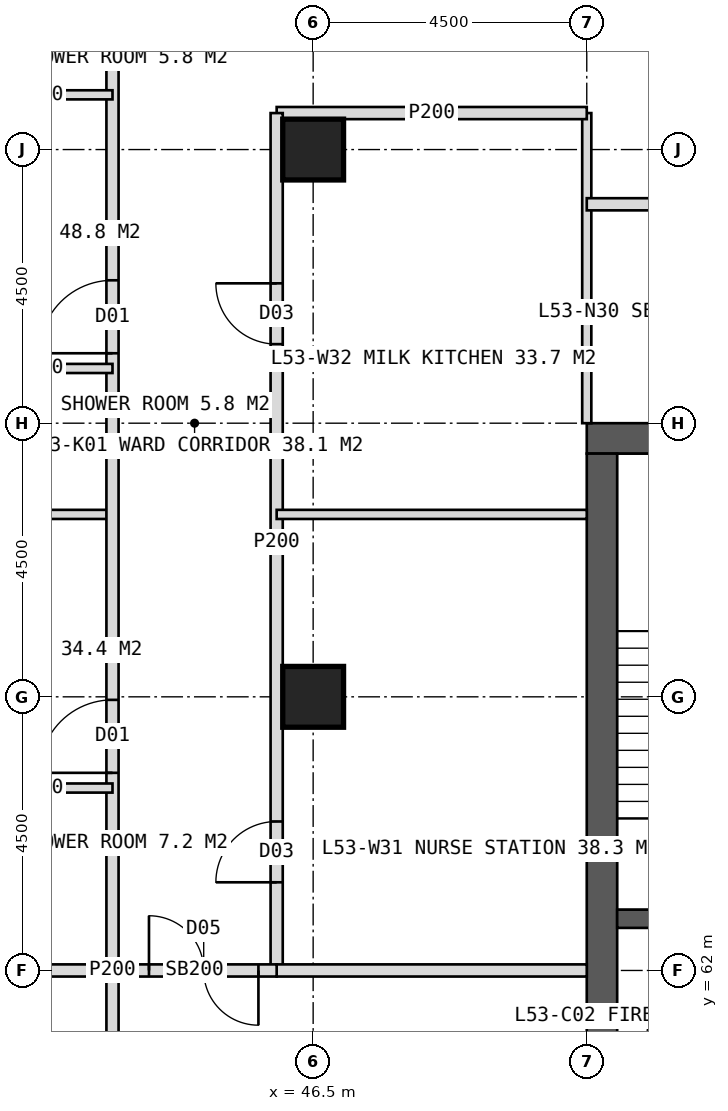
"""IFC4 building model, lengths in metres.
Left out: names, types, materials, properties, quantities, classifications, styles, units other than length and angle.
Written with IfcOpenShell. Run it as: python <this file> out.ifc"""

import sys

from ifc_helpers import new_model, si_unit, direction, frame, frame_2d, origin, origin_2d, place, context, subcontext, project, spatial, rectangle, hollow_rectangle, extrude, element, fill, save


model = new_model("IFC4")
c1 = context("Model", 3, precision=1e-05, world=origin(), true_north=direction((0.0, 1.0)))
c2 = subcontext(c1, "Body", "Model", "MODEL_VIEW")
j1 = project(units=[si_unit("LENGTHUNIT", "METRE"), si_unit("PLANEANGLEUNIT", "RADIAN")], contexts=[c1])
p1 = place(None, origin())
s1 = spatial("IfcSite", under=j1, at=p1, CompositionType="ELEMENT")
p2 = place(p1, origin())
s2 = spatial("IfcBuilding", under=s1, at=p2, CompositionType="ELEMENT")
p3 = place(p2, frame((0.0, 0.0, 221.0)))
s3 = spatial("IfcBuildingStorey", under=s2, at=p3, CompositionType="ELEMENT", Elevation=221.0)
p4 = place(p3, frame((51.0, 70.75, 0.0), z_axis=(0.0, 0.0, 1.0), x_axis=(1.0, 0.0, 0.0)))
e1 = element("IfcWall", 1, at=p4, inside=s3, PredefinedType="SHEAR", context=c2, shape_type="SweptSolid", body=[
    extrude(rectangle(XDim=18.0, YDim=0.5, at=frame_2d((9.0, 0.0))), origin(), (0.0, 0.0, 1.0), 4.0),
])
p5 = place(p4, frame((8.1, 0.0, 0.0)))
e2 = element("IfcOpeningElement", 2, at=p5, cuts=e1, PredefinedType="OPENING", context=c2, shape_type="SweptSolid", body=[
    extrude(rectangle(XDim=1.8, YDim=2.2, at=frame_2d((0.9, 1.1))), frame((0.0, 0.26, 0.0), z_axis=(0.0, -1.0, 0.0), x_axis=(1.0, 0.0, 0.0)), (0.0, 0.0, 1.0), 0.52),
])
p6 = place(p3, frame((51.25, 53.5, 0.0), z_axis=(0.0, 0.0, 1.0), x_axis=(0.0, 1.0, 0.0)))
e3 = element("IfcWall", 3, at=p6, inside=s3, PredefinedType="SHEAR", context=c2, shape_type="SweptSolid", body=[
    extrude(rectangle(XDim=17.0, YDim=0.5, at=frame_2d((8.5, 0.0))), origin(), (0.0, 0.0, 1.0), 4.0),
])
p7 = place(p6, frame((6.1, 0.0, 0.0)))
e4 = element("IfcOpeningElement", 4, at=p7, cuts=e3, PredefinedType="OPENING", context=c2, shape_type="SweptSolid", body=[
    extrude(rectangle(XDim=1.5, YDim=2.2, at=frame_2d((0.75, 1.1))), frame((0.0, 0.26, 0.0), z_axis=(0.0, -1.0, 0.0), x_axis=(1.0, 0.0, 0.0)), (0.0, 0.0, 1.0), 0.52),
])
p8 = place(p3, frame((51.5, 62.85, 0.0), z_axis=(0.0, 0.0, 1.0), x_axis=(1.0, 0.0, 0.0)))
e5 = element("IfcWall", 5, at=p8, inside=s3, PredefinedType="SHEAR", context=c2, shape_type="SweptSolid", body=[
    extrude(rectangle(XDim=3.3, YDim=0.3, at=frame_2d((1.65, 0.0))), origin(), (0.0, 0.0, 1.0), 4.0),
])
p9 = place(p8, frame((1.15, 0.0, 0.0)))
e6 = element("IfcOpeningElement", 6, at=p9, cuts=e5, PredefinedType="OPENING", context=c2, shape_type="SweptSolid", body=[
    extrude(rectangle(XDim=1.2, YDim=2.1, at=frame_2d((0.6, 1.05))), frame((0.0, 0.16, 0.0), z_axis=(0.0, -1.0, 0.0), x_axis=(1.0, 0.0, 0.0)), (0.0, 0.0, 1.0), 0.32),
])
for number, where, z_axis, x_axis in (
    (7, (46.5, 75.5, 0.0), (0.0, 0.0, 1.0), (1.0, 0.0, 0.0)),
    (8, (46.5, 66.5, 0.0), (0.0, 0.0, 1.0), (1.0, 0.0, 0.0)),
):
    element("IfcColumn", number, at=place(p3, frame(where, z_axis=z_axis, x_axis=x_axis)), inside=s3, PredefinedType="COLUMN", context=c2, shape_type="SweptSolid", body=[
        extrude(hollow_rectangle(XDim=1.0, YDim=1.0, WallThickness=0.1, at=origin_2d()), origin(), (0.0, 0.0, 1.0), 4.0),
    ])
p10 = place(p3, frame((51.0, 71.0, 0.0), z_axis=(0.0, 0.0, 1.0), x_axis=(0.0, 1.0, 0.0)))
e9 = element("IfcWall", 9, at=p10, inside=s3, PredefinedType="PARTITIONING", context=c2, shape_type="SweptSolid", body=[
    extrude(rectangle(XDim=5.1, YDim=0.15, at=frame_2d((2.55, 0.0))), origin(), (0.0, 0.0, 1.0), 3.75),
])
p11 = place(p3, frame((45.9, 76.1, 0.0), z_axis=(0.0, 0.0, 1.0), x_axis=(1.0, 0.0, 0.0)))
e10 = element("IfcWall", 10, at=p11, inside=s3, PredefinedType="PARTITIONING", context=c2, shape_type="SweptSolid", body=[
    extrude(rectangle(XDim=5.1, YDim=0.2, at=frame_2d((2.55, 0.0))), origin(), (0.0, 0.0, 1.0), 3.75),
])
p12 = place(p3, frame((51.0, 74.6, 0.0), z_axis=(0.0, 0.0, 1.0), x_axis=(1.0, 0.0, 0.0)))
e11 = element("IfcWall", 11, at=p12, inside=s3, PredefinedType="PARTITIONING", context=c2, shape_type="SweptSolid", body=[
    extrude(rectangle(XDim=6.75, YDim=0.2, at=frame_2d((3.375, 0.0))), origin(), (0.0, 0.0, 1.0), 3.75),
])
p13 = place(p12, frame((1.45, 0.0, 0.0)))
e12 = element("IfcOpeningElement", 12, at=p13, cuts=e11, PredefinedType="OPENING", context=c2, shape_type="SweptSolid", body=[
    extrude(rectangle(XDim=1.0, YDim=2.1, at=frame_2d((0.5, 1.05))), frame((0.0, 0.11, 0.0), z_axis=(0.0, -1.0, 0.0), x_axis=(1.0, 0.0, 0.0)), (0.0, 0.0, 1.0), 0.22),
])
p14 = place(p3, frame((43.2, 62.0, 0.0), z_axis=(0.0, 0.0, 1.0), x_axis=(-1.0, 0.0, 0.0)))
e13 = element("IfcWall", 13, at=p14, inside=s3, PredefinedType="SOLIDWALL", context=c2, shape_type="SweptSolid", body=[
    extrude(rectangle(XDim=5.55, YDim=0.2, at=frame_2d((2.775, 0.0))), origin(), (0.0, 0.0, 1.0), 2.95),
])
p15 = place(p3, frame((43.2, 69.5, 0.0), z_axis=(0.0, 0.0, 1.0), x_axis=(-1.0, 0.0, 0.0)))
e14 = element("IfcWall", 14, at=p15, inside=s3, PredefinedType="PARTITIONING", context=c2, shape_type="SweptSolid", body=[
    extrude(rectangle(XDim=5.55, YDim=0.15, at=frame_2d((2.775, 0.0))), origin(), (0.0, 0.0, 1.0), 3.75),
])
p16 = place(p3, frame((43.2, 45.2, 0.0), z_axis=(0.0, 0.0, 1.0), x_axis=(0.0, 1.0, 0.0)))
e15 = element("IfcWall", 15, at=p16, inside=s3, PredefinedType="PARTITIONING", context=c2, shape_type="SweptSolid", body=[
    extrude(rectangle(XDim=33.6, YDim=0.2, at=frame_2d((16.8, 0.0))), origin(), (0.0, 0.0, 1.0), 3.75),
])
p17 = place(p16, frame((3.25, 0.0, 0.0)))
e16 = element("IfcOpeningElement", 16, at=p17, cuts=e15, PredefinedType="OPENING", context=c2, shape_type="SweptSolid", body=[
    extrude(rectangle(XDim=1.2, YDim=2.2, at=frame_2d((0.6, 1.1))), frame((0.0, 0.11, 0.0), z_axis=(0.0, -1.0, 0.0), x_axis=(1.0, 0.0, 0.0)), (0.0, 0.0, 1.0), 0.22),
])
p18 = place(p16, frame((11.05, 0.0, 0.0)))
e17 = element("IfcOpeningElement", 17, at=p18, cuts=e15, PredefinedType="OPENING", context=c2, shape_type="SweptSolid", body=[
    extrude(rectangle(XDim=1.2, YDim=2.2, at=frame_2d((0.6, 1.1))), frame((0.0, 0.11, 0.0), z_axis=(0.0, -1.0, 0.0), x_axis=(1.0, 0.0, 0.0)), (0.0, 0.0, 1.0), 0.22),
])
p19 = place(p16, frame((20.05, 0.0, 0.0)))
e18 = element("IfcOpeningElement", 18, at=p19, cuts=e15, PredefinedType="OPENING", context=c2, shape_type="SweptSolid", body=[
    extrude(rectangle(XDim=1.2, YDim=2.2, at=frame_2d((0.6, 1.1))), frame((0.0, 0.11, 0.0), z_axis=(0.0, -1.0, 0.0), x_axis=(1.0, 0.0, 0.0)), (0.0, 0.0, 1.0), 0.22),
])
p20 = place(p16, frame((26.95, 0.0, 0.0)))
e19 = element("IfcOpeningElement", 19, at=p20, cuts=e15, PredefinedType="OPENING", context=c2, shape_type="SweptSolid", body=[
    extrude(rectangle(XDim=1.2, YDim=2.2, at=frame_2d((0.6, 1.1))), frame((0.0, 0.11, 0.0), z_axis=(0.0, -1.0, 0.0), x_axis=(1.0, 0.0, 0.0)), (0.0, 0.0, 1.0), 0.22),
])
for number, where, z_axis, x_axis in (
    (20, (43.2, 65.0, 0.0), (0.0, 0.0, 1.0), (-1.0, 0.0, 0.0)),
    (21, (43.2, 71.9, 0.0), (0.0, 0.0, 1.0), (-1.0, 0.0, 0.0)),
    (22, (43.2, 76.4, 0.0), (0.0, 0.0, 1.0), (-1.0, 0.0, 0.0)),
):
    element("IfcWall", number, at=place(p3, frame(where, z_axis=z_axis, x_axis=x_axis)), inside=s3, PredefinedType="PARTITIONING", context=c2, shape_type="SweptSolid", body=[
        extrude(rectangle(XDim=2.4, YDim=0.15, at=frame_2d((1.2, 0.0))), origin(), (0.0, 0.0, 1.0), 3.75),
    ])
p21 = place(p3, frame((45.9, 62.0, 0.0), z_axis=(0.0, 0.0, 1.0), x_axis=(0.0, 1.0, 0.0)))
e23 = element("IfcWall", 23, at=p21, inside=s3, PredefinedType="PARTITIONING", context=c2, shape_type="SweptSolid", body=[
    extrude(rectangle(XDim=14.1, YDim=0.2, at=frame_2d((7.05, 0.0))), origin(), (0.0, 0.0, 1.0), 3.75),
])
p22 = place(p21, frame((1.45, 0.0, 0.0)))
e24 = element("IfcOpeningElement", 24, at=p22, cuts=e23, PredefinedType="OPENING", context=c2, shape_type="SweptSolid", body=[
    extrude(rectangle(XDim=1.0, YDim=2.1, at=frame_2d((0.5, 1.05))), frame((0.0, 0.11, 0.0), z_axis=(0.0, -1.0, 0.0), x_axis=(1.0, 0.0, 0.0)), (0.0, 0.0, 1.0), 0.22),
])
p23 = place(p21, frame((10.3, 0.0, 0.0)))
e25 = element("IfcOpeningElement", 25, at=p23, cuts=e23, PredefinedType="OPENING", context=c2, shape_type="SweptSolid", body=[
    extrude(rectangle(XDim=1.0, YDim=2.1, at=frame_2d((0.5, 1.05))), frame((0.0, 0.11, 0.0), z_axis=(0.0, -1.0, 0.0), x_axis=(1.0, 0.0, 0.0)), (0.0, 0.0, 1.0), 0.22),
])
p24 = place(p3, frame((51.0, 62.0, 0.0), z_axis=(0.0, 0.0, 1.0), x_axis=(-1.0, 0.0, 0.0)))
e26 = element("IfcWall", 26, at=p24, inside=s3, PredefinedType="SOLIDWALL", context=c2, shape_type="SweptSolid", body=[
    extrude(rectangle(XDim=5.1, YDim=0.2, at=frame_2d((2.55, 0.0))), origin(), (0.0, 0.0, 1.0), 2.95),
])
p25 = place(p3, frame((51.0, 69.5, 0.0), z_axis=(0.0, 0.0, 1.0), x_axis=(-1.0, 0.0, 0.0)))
e27 = element("IfcWall", 27, at=p25, inside=s3, PredefinedType="PARTITIONING", context=c2, shape_type="SweptSolid", body=[
    extrude(rectangle(XDim=5.1, YDim=0.15, at=frame_2d((2.55, 0.0))), origin(), (0.0, 0.0, 1.0), 3.75),
])
p26 = place(p3, frame((45.9, 62.0, 0.0), z_axis=(0.0, 0.0, 1.0), x_axis=(-1.0, 0.0, 0.0)))
e28 = element("IfcWall", 28, at=p26, inside=s3, PredefinedType="SOLIDWALL", context=c2, shape_type="SweptSolid", body=[
    extrude(rectangle(XDim=2.7, YDim=0.2, at=frame_2d((1.35, 0.0))), origin(), (0.0, 0.0, 1.0), 2.95),
])
p27 = place(p26, frame((0.3, 0.0, 0.0)))
e29 = element("IfcOpeningElement", 29, at=p27, cuts=e28, PredefinedType="OPENING", context=c2, shape_type="SweptSolid", body=[
    extrude(rectangle(XDim=1.8, YDim=2.2, at=frame_2d((0.9, 1.1))), frame((0.0, 0.11, 0.0), z_axis=(0.0, -1.0, 0.0), x_axis=(1.0, 0.0, 0.0)), (0.0, 0.0, 1.0), 0.22),
])
p28 = place(p19, origin())
e30 = element("IfcDoor", 30, at=p28, inside=s3, OperationType="SINGLE_SWING_LEFT", PredefinedType="DOOR", context=c2, shape_type="SweptSolid", body=[
    extrude(rectangle(XDim=1.2, YDim=2.2, at=frame_2d((0.6, 1.1))), frame((0.0, 0.025, 0.0), z_axis=(0.0, -1.0, 0.0), x_axis=(1.0, 0.0, 0.0)), (0.0, 0.0, 1.0), 0.05),
])
fill(e18, e30)
p29 = place(p20, origin())
e31 = element("IfcDoor", 31, at=p29, inside=s3, OperationType="SINGLE_SWING_LEFT", PredefinedType="DOOR", context=c2, shape_type="SweptSolid", body=[
    extrude(rectangle(XDim=1.2, YDim=2.2, at=frame_2d((0.6, 1.1))), frame((0.0, 0.025, 0.0), z_axis=(0.0, -1.0, 0.0), x_axis=(1.0, 0.0, 0.0)), (0.0, 0.0, 1.0), 0.05),
])
fill(e19, e31)
p30 = place(p22, origin())
e32 = element("IfcDoor", 32, at=p30, inside=s3, OperationType="SINGLE_SWING_LEFT", PredefinedType="DOOR", context=c2, shape_type="SweptSolid", body=[
    extrude(rectangle(XDim=1.0, YDim=2.1, at=frame_2d((0.5, 1.05))), frame((0.0, 0.025, 0.0), z_axis=(0.0, -1.0, 0.0), x_axis=(1.0, 0.0, 0.0)), (0.0, 0.0, 1.0), 0.05),
])
fill(e24, e32)
p31 = place(p23, origin())
e33 = element("IfcDoor", 33, at=p31, inside=s3, OperationType="SINGLE_SWING_RIGHT", PredefinedType="DOOR", context=c2, shape_type="SweptSolid", body=[
    extrude(rectangle(XDim=1.0, YDim=2.1, at=frame_2d((0.5, 1.05))), frame((0.0, 0.025, 0.0), z_axis=(0.0, -1.0, 0.0), x_axis=(1.0, 0.0, 0.0)), (0.0, 0.0, 1.0), 0.05),
])
fill(e25, e33)
p32 = place(p27, origin())
e34 = element("IfcDoor", 34, at=p32, inside=s3, OperationType="DOUBLE_DOOR_DOUBLE_SWING", PredefinedType="DOOR", context=c2, shape_type="SweptSolid", body=[
    extrude(rectangle(XDim=1.8, YDim=2.2, at=frame_2d((0.9, 1.1))), frame((0.0, 0.025, 0.0), z_axis=(0.0, -1.0, 0.0), x_axis=(1.0, 0.0, 0.0)), (0.0, 0.0, 1.0), 0.05),
])
fill(e29, e34)
p33 = place(p7, origin())
e35 = element("IfcDoor", 35, at=p33, inside=s3, OperationType="DOUBLE_DOOR_SINGLE_SWING", PredefinedType="DOOR", context=c2, shape_type="SweptSolid", body=[
    extrude(rectangle(XDim=1.5, YDim=2.2, at=frame_2d((0.75, 1.1))), frame((0.0, 0.025, 0.0), z_axis=(0.0, -1.0, 0.0), x_axis=(1.0, 0.0, 0.0)), (0.0, 0.0, 1.0), 0.05),
])
fill(e4, e35)
save(model, sys.argv[1])
